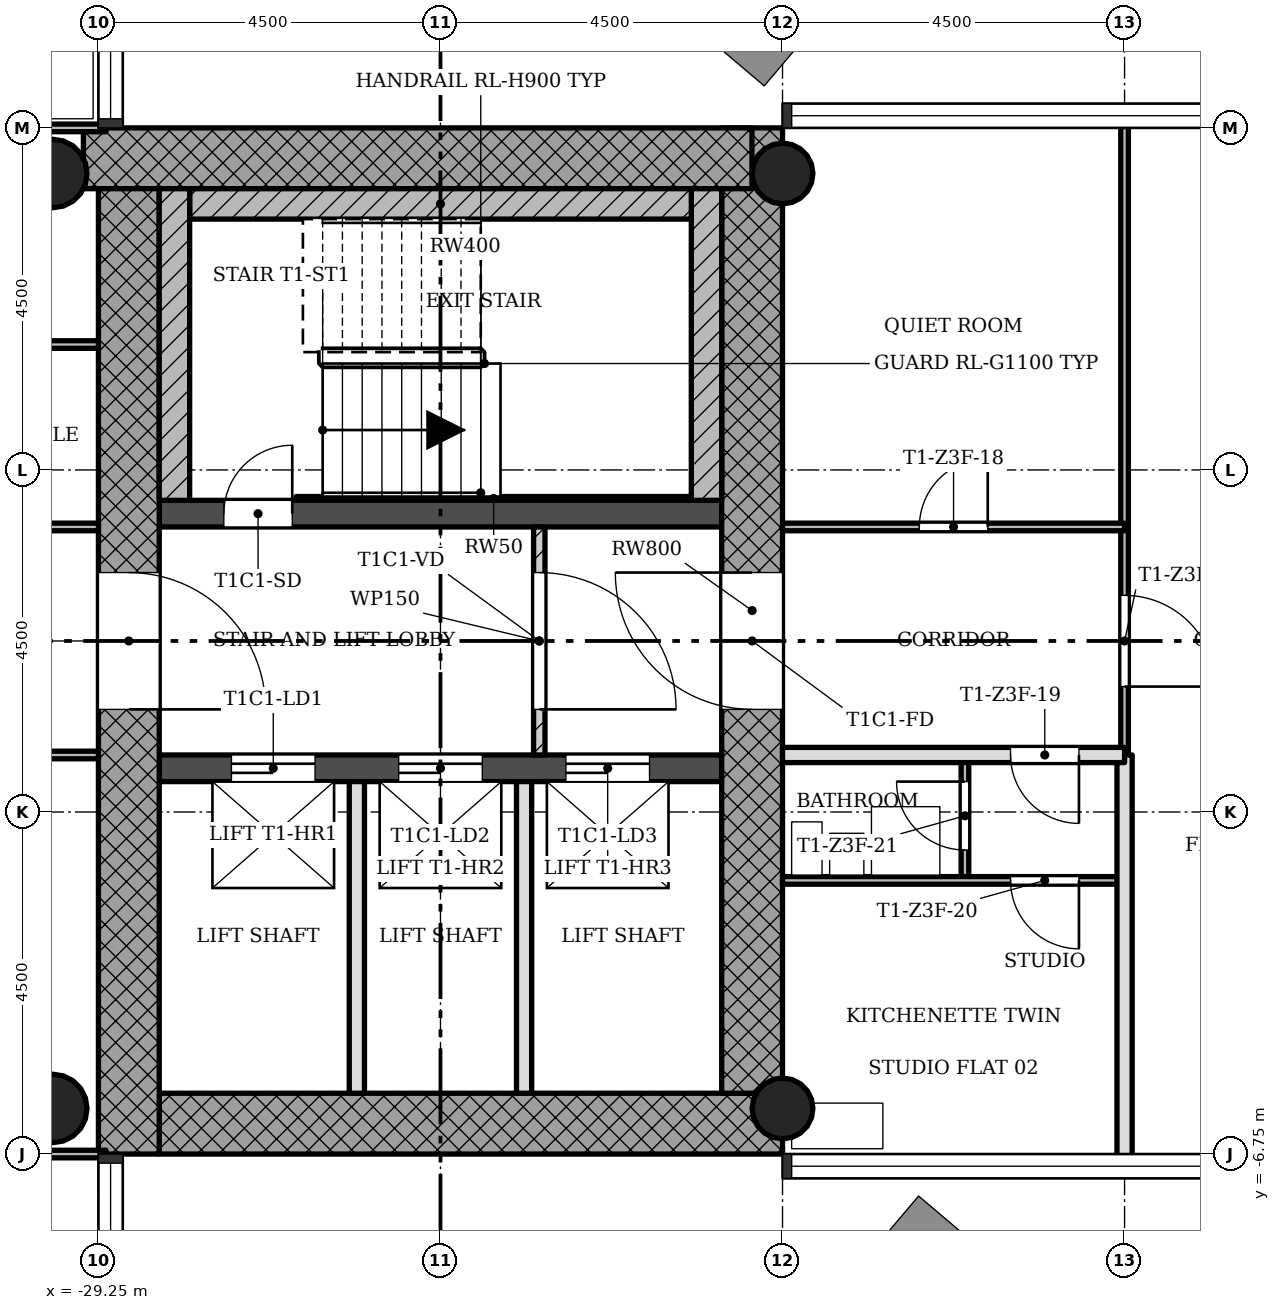
"""IFC4 building model, lengths in metres.
Left out: names, types, materials, properties, quantities, classifications, styles, units other than length and angle.
Written with IfcOpenShell. Run it as: python <this file> out.ifc"""

import sys

from ifc_helpers import new_model, si_unit, direction, frame, frame_2d, origin, origin_2d, place, context, subcontext, project, spatial, rectangle, hollow_circle, extrude, element, fill, save


model = new_model("IFC4")
c1 = context("Model", 3, precision=1e-05, world=origin(), true_north=direction((0.0, 1.0)))
c2 = subcontext(c1, "Body", "Model", "MODEL_VIEW")
j1 = project(units=[si_unit("LENGTHUNIT", "METRE"), si_unit("PLANEANGLEUNIT", "RADIAN")], contexts=[c1])
p1 = place(None, origin())
s1 = spatial("IfcSite", under=j1, at=p1, CompositionType="ELEMENT")
p2 = place(p1, origin())
s2 = spatial("IfcBuilding", under=s1, at=p2, CompositionType="ELEMENT")
p3 = place(p2, frame((0.0, 0.0, 171.1)))
s3 = spatial("IfcBuildingStorey", under=s2, at=p3, CompositionType="ELEMENT", Elevation=171.1)
p4 = place(p3, frame((-28.45, -6.35, 0.0), z_axis=(0.0, 0.0, 1.0), x_axis=(1.0, 0.0, 0.0)))
e1 = element("IfcWall", 1, at=p4, inside=s3, PredefinedType="SHEAR", context=c2, shape_type="SweptSolid", body=[
    extrude(rectangle(XDim=8.2, YDim=0.8, at=frame_2d((4.1, 0.0))), origin(), (0.0, 0.0, 1.0), 3.4),
])
p5 = place(p3, frame((-20.65, -5.95, 0.0), z_axis=(0.0, 0.0, 1.0), x_axis=(0.0, 1.0, 0.0)))
e2 = element("IfcWall", 2, at=p5, inside=s3, PredefinedType="SHEAR", context=c2, shape_type="SweptSolid", body=[
    extrude(rectangle(XDim=12.7, YDim=0.8, at=frame_2d((6.35, 0.0))), origin(), (0.0, 0.0, 1.0), 3.4),
])
p6 = place(p5, frame((5.05, 0.0, 0.0)))
e3 = element("IfcOpeningElement", 3, at=p6, cuts=e2, PredefinedType="OPENING", context=c2, shape_type="SweptSolid", body=[
    extrude(rectangle(XDim=1.8, YDim=2.1, at=frame_2d((0.9, 1.05))), frame((0.0, 0.41, 0.0), z_axis=(0.0, -1.0, 0.0), x_axis=(1.0, 0.0, 0.0)), (0.0, 0.0, 1.0), 0.82),
])
p7 = place(p3, frame((-20.652, 6.35, 0.0), z_axis=(0.0, 0.0, 1.0), x_axis=(-1.0, 0.0, 0.0)))
e4 = element("IfcWall", 4, at=p7, inside=s3, PredefinedType="SHEAR", context=c2, shape_type="SweptSolid", body=[
    extrude(rectangle(XDim=8.796, YDim=0.8, at=frame_2d((4.398, 0.0))), origin(), (0.0, 0.0, 1.0), 3.4),
])
p8 = place(p3, frame((-28.85, 5.95, 0.0), z_axis=(0.0, 0.0, 1.0), x_axis=(0.0, -1.0, 0.0)))
e5 = element("IfcWall", 5, at=p8, inside=s3, PredefinedType="SHEAR", context=c2, shape_type="SweptSolid", body=[
    extrude(rectangle(XDim=12.7, YDim=0.8, at=frame_2d((6.35, 0.0))), origin(), (0.0, 0.0, 1.0), 3.4),
])
p9 = place(p8, frame((5.05, 0.0, 0.0)))
e6 = element("IfcOpeningElement", 6, at=p9, cuts=e5, PredefinedType="OPENING", context=c2, shape_type="SweptSolid", body=[
    extrude(rectangle(XDim=1.8, YDim=2.1, at=frame_2d((0.9, 1.05))), frame((0.0, 0.41, 0.0), z_axis=(0.0, -1.0, 0.0), x_axis=(1.0, 0.0, 0.0)), (0.0, 0.0, 1.0), 0.82),
])
p10 = place(p3, frame((-28.45, -1.675, 0.0), z_axis=(0.0, 0.0, 1.0), x_axis=(1.0, 0.0, 0.0)))
e7 = element("IfcWall", 7, at=p10, inside=s3, PredefinedType="SHEAR", context=c2, shape_type="SweptSolid", body=[
    extrude(rectangle(XDim=7.4, YDim=0.35, at=frame_2d((3.7, 0.0))), origin(), (0.0, 0.0, 1.0), 3.4),
])
p11 = place(p10, frame((0.95, 0.0, 0.0)))
e8 = element("IfcOpeningElement", 8, at=p11, cuts=e7, PredefinedType="OPENING", context=c2, shape_type="SweptSolid", body=[
    extrude(rectangle(XDim=1.1, YDim=2.1, at=frame_2d((0.55, 1.05))), frame((0.0, 0.185, 0.0), z_axis=(0.0, -1.0, 0.0), x_axis=(1.0, 0.0, 0.0)), (0.0, 0.0, 1.0), 0.37),
])
p12 = place(p10, frame((3.15, 0.0, 0.0)))
e9 = element("IfcOpeningElement", 9, at=p12, cuts=e7, PredefinedType="OPENING", context=c2, shape_type="SweptSolid", body=[
    extrude(rectangle(XDim=1.1, YDim=2.1, at=frame_2d((0.55, 1.05))), frame((0.0, 0.185, 0.0), z_axis=(0.0, -1.0, 0.0), x_axis=(1.0, 0.0, 0.0)), (0.0, 0.0, 1.0), 0.37),
])
p13 = place(p10, frame((5.35, 0.0, 0.0)))
e10 = element("IfcOpeningElement", 10, at=p13, cuts=e7, PredefinedType="OPENING", context=c2, shape_type="SweptSolid", body=[
    extrude(rectangle(XDim=1.1, YDim=2.1, at=frame_2d((0.55, 1.05))), frame((0.0, 0.185, 0.0), z_axis=(0.0, -1.0, 0.0), x_axis=(1.0, 0.0, 0.0)), (0.0, 0.0, 1.0), 0.37),
])
p14 = place(p3, frame((-28.45, 1.675, 0.0), z_axis=(0.0, 0.0, 1.0), x_axis=(1.0, 0.0, 0.0)))
e11 = element("IfcWall", 11, at=p14, inside=s3, PredefinedType="SHEAR", context=c2, shape_type="SweptSolid", body=[
    extrude(rectangle(XDim=7.4, YDim=0.35, at=frame_2d((3.7, 0.0))), origin(), (0.0, 0.0, 1.0), 3.4),
])
p15 = place(p14, frame((0.85, 0.0, 0.0)))
e12 = element("IfcOpeningElement", 12, at=p15, cuts=e11, PredefinedType="OPENING", context=c2, shape_type="SweptSolid", body=[
    extrude(rectangle(XDim=0.9, YDim=2.1, at=frame_2d((0.45, 1.05))), frame((0.0, 0.185, 0.0), z_axis=(0.0, -1.0, 0.0), x_axis=(1.0, 0.0, 0.0)), (0.0, 0.0, 1.0), 0.37),
])
for number, where, z_axis, x_axis in (
    (13, (-20.25, -6.15, 0.0), (0.0, 0.0, 1.0), (1.0, 0.0, 0.0)),
    (14, (-20.25, 6.15, 0.0), (0.0, 0.0, 1.0), (1.0, 0.0, 0.0)),
):
    element("IfcColumn", number, at=place(p3, frame(where, z_axis=z_axis, x_axis=x_axis)), inside=s3, PredefinedType="COLUMN", context=c2, shape_type="SweptSolid", body=[
        extrude(hollow_circle(Radius=0.4, WallThickness=0.028, at=origin_2d()), origin(), (0.0, 0.0, 1.0), 3.4),
    ])
for number, where, z_axis, x_axis in (
    (15, (-29.85, -6.15, 0.0), (0.0, 0.0, 1.0), (1.0, 0.0, 0.0)),
    (16, (-29.85, 6.15, 0.0), (0.0, 0.0, 1.0), (1.0, 0.0, 0.0)),
):
    element("IfcColumn", number, at=place(p3, frame(where, z_axis=z_axis, x_axis=x_axis)), inside=s3, PredefinedType="COLUMN", context=c2, shape_type="SweptSolid", body=[
        extrude(hollow_circle(Radius=0.45, WallThickness=0.032, at=origin_2d()), origin(), (0.0, 0.0, 1.0), 3.4),
    ])
p16 = place(p3, frame((-23.45, -1.5, 0.0), z_axis=(0.0, 0.0, 1.0), x_axis=(0.0, 1.0, 0.0)))
e17 = element("IfcWall", 17, at=p16, inside=s3, PredefinedType="PARTITIONING", context=c2, shape_type="SweptSolid", body=[
    extrude(rectangle(XDim=3.0, YDim=0.15, at=frame_2d((1.5, 0.0))), origin(), (0.0, 0.0, 1.0), 3.0),
])
p17 = place(p16, frame((0.6, 0.0, 0.0)))
e18 = element("IfcOpeningElement", 18, at=p17, cuts=e17, PredefinedType="OPENING", context=c2, shape_type="SweptSolid", body=[
    extrude(rectangle(XDim=1.8, YDim=2.1, at=frame_2d((0.9, 1.05))), frame((0.0, 0.085, 0.0), z_axis=(0.0, -1.0, 0.0), x_axis=(1.0, 0.0, 0.0)), (0.0, 0.0, 1.0), 0.17),
])
for number, where, z_axis, x_axis in (
    (19, (-25.85, -5.95, 0.0), (0.0, 0.0, 1.0), (0.0, 1.0, 0.0)),
    (20, (-23.65, -5.95, 0.0), (0.0, 0.0, 1.0), (0.0, 1.0, 0.0)),
):
    element("IfcWall", number, at=place(p3, frame(where, z_axis=z_axis, x_axis=x_axis)), inside=s3, PredefinedType="SOLIDWALL", context=c2, shape_type="SweptSolid", body=[
        extrude(rectangle(XDim=4.1, YDim=0.2, at=frame_2d((2.05, 0.0))), origin(), (0.0, 0.0, 1.0), 3.0),
    ])
p18 = place(p3, frame((-17.85, -3.15, 0.0), z_axis=(0.0, 0.0, 1.0), x_axis=(0.0, 1.0, 0.0)))
e21 = element("IfcWall", 21, at=p18, inside=s3, PredefinedType="PARTITIONING", context=c2, shape_type="SweptSolid", body=[
    extrude(rectangle(XDim=1.65, YDim=0.1, at=frame_2d((0.825, 0.0))), origin(), (0.0, 0.0, 1.0), 3.0),
])
p19 = place(p18, frame((0.4, 0.0, 0.0)))
e22 = element("IfcOpeningElement", 22, at=p19, cuts=e21, PredefinedType="OPENING", context=c2, shape_type="SweptSolid", body=[
    extrude(rectangle(XDim=0.9, YDim=2.1, at=frame_2d((0.45, 1.05))), frame((0.0, 0.06, 0.0), z_axis=(0.0, -1.0, 0.0), x_axis=(1.0, 0.0, 0.0)), (0.0, 0.0, 1.0), 0.12),
])
p20 = place(p3, frame((-15.75, -1.5, 0.0), z_axis=(0.0, 0.0, 1.0), x_axis=(0.0, 1.0, 0.0)))
e23 = element("IfcWall", 23, at=p20, inside=s3, PredefinedType="PARTITIONING", context=c2, shape_type="SweptSolid", body=[
    extrude(rectangle(XDim=8.35, YDim=0.1, at=frame_2d((4.175, 0.0))), origin(), (0.0, 0.0, 1.0), 3.0),
])
p21 = place(p20, frame((0.9, 0.0, 0.0)))
e24 = element("IfcOpeningElement", 24, at=p21, cuts=e23, PredefinedType="OPENING", context=c2, shape_type="SweptSolid", body=[
    extrude(rectangle(XDim=1.2, YDim=2.1, at=frame_2d((0.6, 1.05))), frame((0.0, 0.06, 0.0), z_axis=(0.0, -1.0, 0.0), x_axis=(1.0, 0.0, 0.0)), (0.0, 0.0, 1.0), 0.12),
])
p22 = place(p3, frame((-15.75, -6.85, 0.0), z_axis=(0.0, 0.0, 1.0), x_axis=(0.0, 1.0, 0.0)))
e25 = element("IfcWall", 25, at=p22, inside=s3, PredefinedType="SOLIDWALL", context=c2, shape_type="SweptSolid", body=[
    extrude(rectangle(XDim=5.35, YDim=0.2, at=frame_2d((2.675, 0.0))), origin(), (0.0, 0.0, 1.0), 3.0),
])
p23 = place(p3, frame((-35.1, -6.75, 0.0), z_axis=(0.0, 0.0, 1.0), x_axis=(1.0, 0.0, 0.0)))
e26 = element("IfcWall", 26, at=p23, inside=s3, PredefinedType="PARTITIONING", context=c2, shape_type="SweptSolid", body=[
    extrude(rectangle(XDim=5.95, YDim=0.1, at=frame_2d((2.975, 0.0))), origin(), (0.0, 0.0, 1.0), 3.0),
])
p24 = place(p3, frame((-20.25, -3.15, 0.0), z_axis=(0.0, 0.0, 1.0), x_axis=(1.0, 0.0, 0.0)))
e27 = element("IfcWall", 27, at=p24, inside=s3, PredefinedType="PARTITIONING", context=c2, shape_type="SweptSolid", body=[
    extrude(rectangle(XDim=4.5, YDim=0.1, at=frame_2d((2.25, 0.0))), origin(), (0.0, 0.0, 1.0), 3.0),
])
p25 = place(p24, frame((3.0, 0.0, 0.0)))
e28 = element("IfcOpeningElement", 28, at=p25, cuts=e27, PredefinedType="OPENING", context=c2, shape_type="SweptSolid", body=[
    extrude(rectangle(XDim=0.9, YDim=2.1, at=frame_2d((0.45, 1.05))), frame((0.0, 0.06, 0.0), z_axis=(0.0, -1.0, 0.0), x_axis=(1.0, 0.0, 0.0)), (0.0, 0.0, 1.0), 0.12),
])
p26 = place(p3, frame((-31.5, -1.5, 0.0), z_axis=(0.0, 0.0, 1.0), x_axis=(1.0, 0.0, 0.0)))
e29 = element("IfcWall", 29, at=p26, inside=s3, PredefinedType="PARTITIONING", context=c2, shape_type="SweptSolid", body=[
    extrude(rectangle(XDim=2.25, YDim=0.1, at=frame_2d((1.125, 0.0))), origin(), (0.0, 0.0, 1.0), 3.0),
])
p27 = place(p3, frame((-20.25, -1.5, 0.0), z_axis=(0.0, 0.0, 1.0), x_axis=(1.0, 0.0, 0.0)))
e30 = element("IfcWall", 30, at=p27, inside=s3, PredefinedType="SOLIDWALL", context=c2, shape_type="SweptSolid", body=[
    extrude(rectangle(XDim=4.5, YDim=0.2, at=frame_2d((2.25, 0.0))), origin(), (0.0, 0.0, 1.0), 3.0),
])
p28 = place(p27, frame((3.0, 0.0, 0.0)))
e31 = element("IfcOpeningElement", 31, at=p28, cuts=e30, PredefinedType="OPENING", context=c2, shape_type="SweptSolid", body=[
    extrude(rectangle(XDim=0.9, YDim=2.1, at=frame_2d((0.45, 1.05))), frame((0.0, 0.11, 0.0), z_axis=(0.0, -1.0, 0.0), x_axis=(1.0, 0.0, 0.0)), (0.0, 0.0, 1.0), 0.22),
])
p29 = place(p3, frame((-31.5, 1.5, 0.0), z_axis=(0.0, 0.0, 1.0), x_axis=(1.0, 0.0, 0.0)))
e32 = element("IfcWall", 32, at=p29, inside=s3, PredefinedType="PARTITIONING", context=c2, shape_type="SweptSolid", body=[
    extrude(rectangle(XDim=2.25, YDim=0.1, at=frame_2d((1.125, 0.0))), origin(), (0.0, 0.0, 1.0), 3.0),
])
p30 = place(p29, frame((0.675, 0.0, 0.0)))
e33 = element("IfcOpeningElement", 33, at=p30, cuts=e32, PredefinedType="OPENING", context=c2, shape_type="SweptSolid", body=[
    extrude(rectangle(XDim=0.9, YDim=2.1, at=frame_2d((0.45, 1.05))), frame((0.0, 0.06, 0.0), z_axis=(0.0, -1.0, 0.0), x_axis=(1.0, 0.0, 0.0)), (0.0, 0.0, 1.0), 0.12),
])
p31 = place(p3, frame((-20.25, 1.5, 0.0), z_axis=(0.0, 0.0, 1.0), x_axis=(1.0, 0.0, 0.0)))
e34 = element("IfcWall", 34, at=p31, inside=s3, PredefinedType="PARTITIONING", context=c2, shape_type="SweptSolid", body=[
    extrude(rectangle(XDim=4.5, YDim=0.1, at=frame_2d((2.25, 0.0))), origin(), (0.0, 0.0, 1.0), 3.0),
])
p32 = place(p31, frame((1.8, 0.0, 0.0)))
e35 = element("IfcOpeningElement", 35, at=p32, cuts=e34, PredefinedType="OPENING", context=c2, shape_type="SweptSolid", body=[
    extrude(rectangle(XDim=0.9, YDim=2.1, at=frame_2d((0.45, 1.05))), frame((0.0, 0.06, 0.0), z_axis=(0.0, -1.0, 0.0), x_axis=(1.0, 0.0, 0.0)), (0.0, 0.0, 1.0), 0.12),
])
p33 = place(p3, frame((-31.5, 3.9, 0.0), z_axis=(0.0, 0.0, 1.0), x_axis=(1.0, 0.0, 0.0)))
e36 = element("IfcWall", 36, at=p33, inside=s3, PredefinedType="PARTITIONING", context=c2, shape_type="SweptSolid", body=[
    extrude(rectangle(XDim=2.25, YDim=0.1, at=frame_2d((1.125, 0.0))), origin(), (0.0, 0.0, 1.0), 3.0),
])
p34 = place(p3, frame((-35.1, 6.75, 0.0), z_axis=(0.0, 0.0, 1.0), x_axis=(1.0, 0.0, 0.0)))
e37 = element("IfcWall", 37, at=p34, inside=s3, PredefinedType="PARTITIONING", context=c2, shape_type="SweptSolid", body=[
    extrude(rectangle(XDim=5.95, YDim=0.1, at=frame_2d((2.975, 0.0))), origin(), (0.0, 0.0, 1.0), 3.0),
])
p35 = place(p3, frame((-21.25, 1.85, 0.0), z_axis=(0.0, 0.0, 1.0), x_axis=(0.0, 1.0, 0.0)))
e38 = element("IfcWall", 38, at=p35, inside=s3, PredefinedType="SHEAR", context=c2, shape_type="SweptSolid", body=[
    extrude(rectangle(XDim=4.1, YDim=0.4, at=frame_2d((2.05, 0.0))), origin(), (0.0, 0.0, 1.0), 3.4),
])
p36 = place(p3, frame((-28.05, 5.75, 0.0), z_axis=(0.0, 0.0, 1.0), x_axis=(1.0, 0.0, 0.0)))
e39 = element("IfcWall", 39, at=p36, inside=s3, PredefinedType="SHEAR", context=c2, shape_type="SweptSolid", body=[
    extrude(rectangle(XDim=6.6, YDim=0.4, at=frame_2d((3.3, 0.0))), origin(), (0.0, 0.0, 1.0), 3.4),
])
p37 = place(p3, frame((-28.25, 1.85, 0.0), z_axis=(0.0, 0.0, 1.0), x_axis=(0.0, 1.0, 0.0)))
e40 = element("IfcWall", 40, at=p37, inside=s3, PredefinedType="SHEAR", context=c2, shape_type="SweptSolid", body=[
    extrude(rectangle(XDim=4.1, YDim=0.4, at=frame_2d((2.05, 0.0))), origin(), (0.0, 0.0, 1.0), 3.4),
])
p38 = place(p3, frame((-26.65, 1.875, 0.0), z_axis=(0.0, 0.0, 1.0), x_axis=(1.0, 0.0, 0.0)))
e41 = element("IfcWall", 41, at=p38, inside=s3, PredefinedType="SHEAR", context=c2, shape_type="SweptSolid", body=[
    extrude(rectangle(XDim=5.2, YDim=0.05, at=frame_2d((2.6, 0.0))), origin(), (0.0, 0.0, 1.0), 3.4),
])
p39 = place(p17, origin())
e42 = element("IfcDoor", 42, at=p39, inside=s3, OperationType="SINGLE_SWING_LEFT", PredefinedType="DOOR", context=c2, shape_type="SweptSolid", body=[
    extrude(rectangle(XDim=1.8, YDim=2.1, at=frame_2d((0.9, 1.05))), frame((0.0, 0.025, 0.0), z_axis=(0.0, -1.0, 0.0), x_axis=(1.0, 0.0, 0.0)), (0.0, 0.0, 1.0), 0.05),
])
fill(e18, e42)
p40 = place(p32, origin())
e43 = element("IfcDoor", 43, at=p40, inside=s3, OperationType="SINGLE_SWING_LEFT", PredefinedType="DOOR", context=c2, shape_type="SweptSolid", body=[
    extrude(rectangle(XDim=0.9, YDim=2.1, at=frame_2d((0.45, 1.05))), frame((0.0, 0.025, 0.0), z_axis=(0.0, -1.0, 0.0), x_axis=(1.0, 0.0, 0.0)), (0.0, 0.0, 1.0), 0.05),
])
fill(e35, e43)
p41 = place(p28, origin())
e44 = element("IfcDoor", 44, at=p41, inside=s3, OperationType="SINGLE_SWING_RIGHT", PredefinedType="DOOR", context=c2, shape_type="SweptSolid", body=[
    extrude(rectangle(XDim=0.9, YDim=2.1, at=frame_2d((0.45, 1.05))), frame((0.0, 0.025, 0.0), z_axis=(0.0, -1.0, 0.0), x_axis=(1.0, 0.0, 0.0)), (0.0, 0.0, 1.0), 0.05),
])
fill(e31, e44)
p42 = place(p25, origin())
e45 = element("IfcDoor", 45, at=p42, inside=s3, OperationType="SINGLE_SWING_RIGHT", PredefinedType="DOOR", context=c2, shape_type="SweptSolid", body=[
    extrude(rectangle(XDim=0.9, YDim=2.1, at=frame_2d((0.45, 1.05))), frame((0.0, 0.025, 0.0), z_axis=(0.0, -1.0, 0.0), x_axis=(1.0, 0.0, 0.0)), (0.0, 0.0, 1.0), 0.05),
])
fill(e28, e45)
p43 = place(p19, origin())
e46 = element("IfcDoor", 46, at=p43, inside=s3, OperationType="SINGLE_SWING_LEFT", PredefinedType="DOOR", context=c2, shape_type="SweptSolid", body=[
    extrude(rectangle(XDim=0.9, YDim=2.1, at=frame_2d((0.45, 1.05))), frame((0.0, 0.025, 0.0), z_axis=(0.0, -1.0, 0.0), x_axis=(1.0, 0.0, 0.0)), (0.0, 0.0, 1.0), 0.05),
])
fill(e22, e46)
p44 = place(p21, origin())
e47 = element("IfcDoor", 47, at=p44, inside=s3, OperationType="SINGLE_SWING_LEFT", PredefinedType="DOOR", context=c2, shape_type="SweptSolid", body=[
    extrude(rectangle(XDim=1.2, YDim=2.1, at=frame_2d((0.6, 1.05))), frame((0.0, 0.025, 0.0), z_axis=(0.0, -1.0, 0.0), x_axis=(1.0, 0.0, 0.0)), (0.0, 0.0, 1.0), 0.05),
])
fill(e24, e47)
p45 = place(p15, origin())
e48 = element("IfcDoor", 48, at=p45, inside=s3, OperationType="SINGLE_SWING_LEFT", PredefinedType="DOOR", context=c2, shape_type="SweptSolid", body=[
    extrude(rectangle(XDim=0.9, YDim=2.1, at=frame_2d((0.45, 1.05))), frame((0.0, 0.025, 0.0), z_axis=(0.0, -1.0, 0.0), x_axis=(1.0, 0.0, 0.0)), (0.0, 0.0, 1.0), 0.05),
])
fill(e12, e48)
p46 = place(p11, origin())
e49 = element("IfcDoor", 49, at=p46, inside=s3, OperationType="SLIDING_TO_LEFT", PredefinedType="DOOR", context=c2, shape_type="SweptSolid", body=[
    extrude(rectangle(XDim=1.1, YDim=2.1, at=frame_2d((0.55, 1.05))), frame((0.0, 0.025, 0.0), z_axis=(0.0, -1.0, 0.0), x_axis=(1.0, 0.0, 0.0)), (0.0, 0.0, 1.0), 0.05),
])
fill(e8, e49)
p47 = place(p12, origin())
e50 = element("IfcDoor", 50, at=p47, inside=s3, OperationType="SLIDING_TO_LEFT", PredefinedType="DOOR", context=c2, shape_type="SweptSolid", body=[
    extrude(rectangle(XDim=1.1, YDim=2.1, at=frame_2d((0.55, 1.05))), frame((0.0, 0.025, 0.0), z_axis=(0.0, -1.0, 0.0), x_axis=(1.0, 0.0, 0.0)), (0.0, 0.0, 1.0), 0.05),
])
fill(e9, e50)
p48 = place(p13, origin())
e51 = element("IfcDoor", 51, at=p48, inside=s3, OperationType="SLIDING_TO_LEFT", PredefinedType="DOOR", context=c2, shape_type="SweptSolid", body=[
    extrude(rectangle(XDim=1.1, YDim=2.1, at=frame_2d((0.55, 1.05))), frame((0.0, 0.025, 0.0), z_axis=(0.0, -1.0, 0.0), x_axis=(1.0, 0.0, 0.0)), (0.0, 0.0, 1.0), 0.05),
])
fill(e10, e51)
p49 = place(p9, origin())
e52 = element("IfcDoor", 52, at=p49, inside=s3, OperationType="SINGLE_SWING_LEFT", PredefinedType="DOOR", context=c2, shape_type="SweptSolid", body=[
    extrude(rectangle(XDim=1.8, YDim=2.1, at=frame_2d((0.9, 1.05))), frame((0.0, 0.025, 0.0), z_axis=(0.0, -1.0, 0.0), x_axis=(1.0, 0.0, 0.0)), (0.0, 0.0, 1.0), 0.05),
])
fill(e6, e52)
p50 = place(p6, origin())
e53 = element("IfcDoor", 53, at=p50, inside=s3, OperationType="SINGLE_SWING_LEFT", PredefinedType="DOOR", context=c2, shape_type="SweptSolid", body=[
    extrude(rectangle(XDim=1.8, YDim=2.1, at=frame_2d((0.9, 1.05))), frame((0.0, 0.025, 0.0), z_axis=(0.0, -1.0, 0.0), x_axis=(1.0, 0.0, 0.0)), (0.0, 0.0, 1.0), 0.05),
])
fill(e3, e53)
save(model, sys.argv[1])
